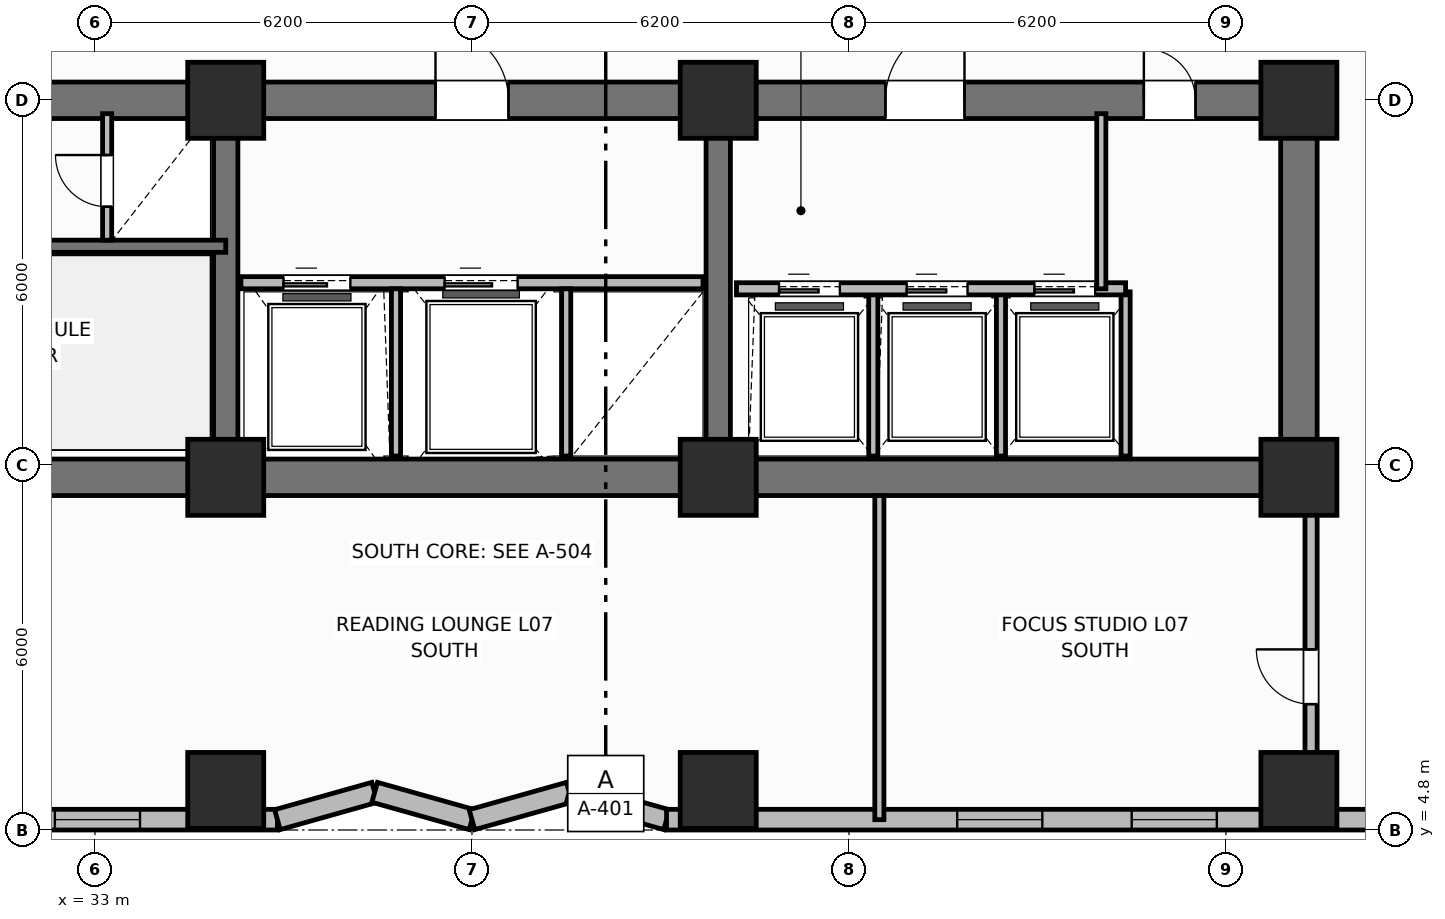
"""IFC4 building model, lengths in metres.
Left out: names, types, materials, properties, quantities, classifications, styles, units other than length and angle.
Written with IfcOpenShell. Run it as: python <this file> out.ifc"""

import sys

from ifc_helpers import new_model, si_unit, direction, frame, frame_2d, origin, origin_2d, place, context, subcontext, project, spatial, rectangle, extrude, element, fill, save


model = new_model("IFC4")
c1 = context("Model", 3, precision=1e-05, world=origin(), true_north=direction((0.0, 1.0)))
c2 = subcontext(c1, "Body", "Model", "MODEL_VIEW")
j1 = project(units=[si_unit("LENGTHUNIT", "METRE"), si_unit("PLANEANGLEUNIT", "RADIAN")], contexts=[c1])
p1 = place(None, origin())
s1 = spatial("IfcSite", under=j1, at=p1, CompositionType="ELEMENT")
p2 = place(p1, origin())
s2 = spatial("IfcBuilding", under=s1, at=p2, CompositionType="ELEMENT")
p3 = place(p2, frame((0.0, 0.0, 32.5)))
s3 = spatial("IfcBuildingStorey", under=s2, at=p3, CompositionType="ELEMENT", Elevation=32.5)
p4 = place(p3, frame((52.8, 10.6, 0.0), z_axis=(0.0, 0.0, 1.0), x_axis=(-1.0, 0.0, 0.0)))
e1 = element("IfcWall", 1, at=p4, inside=s3, PredefinedType="SHEAR", context=c2, shape_type="SweptSolid", body=[
    extrude(rectangle(XDim=27.2, YDim=0.6, at=frame_2d((13.6, 0.0))), origin(), (0.0, 0.0, 1.0), 3.7),
])
p5 = place(p3, frame((52.8, 10.9, 0.0), z_axis=(0.0, 0.0, 1.0), x_axis=(0.0, 1.0, 0.0)))
e2 = element("IfcWall", 2, at=p5, inside=s3, PredefinedType="SHEAR", context=c2, shape_type="SweptSolid", body=[
    extrude(rectangle(XDim=5.6, YDim=0.6, at=frame_2d((2.8, 0.0))), origin(), (0.0, 0.0, 1.0), 3.7),
])
p6 = place(p3, frame((25.6, 16.8, 0.0), z_axis=(0.0, 0.0, 1.0), x_axis=(1.0, 0.0, 0.0)))
e3 = element("IfcWall", 3, at=p6, inside=s3, PredefinedType="SHEAR", context=c2, shape_type="SweptSolid", body=[
    extrude(rectangle(XDim=27.2, YDim=0.6, at=frame_2d((13.6, 0.0))), origin(), (0.0, 0.0, 1.0), 3.7),
])
p7 = place(p6, frame((1.9, 0.0, 0.0)))
e4 = element("IfcOpeningElement", 4, at=p7, cuts=e3, PredefinedType="OPENING", context=c2, shape_type="SweptSolid", body=[
    extrude(rectangle(XDim=1.1, YDim=2.15, at=frame_2d((0.55, 1.075))), frame((0.0, 0.31, 0.0), z_axis=(0.0, -1.0, 0.0), x_axis=(1.0, 0.0, 0.0)), (0.0, 0.0, 1.0), 0.62),
])
p8 = place(p6, frame((13.0, 0.0, 0.0)))
e5 = element("IfcOpeningElement", 5, at=p8, cuts=e3, PredefinedType="OPENING", context=c2, shape_type="SweptSolid", body=[
    extrude(rectangle(XDim=1.2, YDim=2.15, at=frame_2d((0.6, 1.075))), frame((0.0, 0.31, 0.0), z_axis=(0.0, -1.0, 0.0), x_axis=(1.0, 0.0, 0.0)), (0.0, 0.0, 1.0), 0.62),
])
p9 = place(p6, frame((20.4, 0.0, 0.0)))
e6 = element("IfcOpeningElement", 6, at=p9, cuts=e3, PredefinedType="OPENING", context=c2, shape_type="SweptSolid", body=[
    extrude(rectangle(XDim=1.3, YDim=2.2, at=frame_2d((0.65, 1.1))), frame((0.0, 0.31, 0.0), z_axis=(0.0, -1.0, 0.0), x_axis=(1.0, 0.0, 0.0)), (0.0, 0.0, 1.0), 0.62),
])
p10 = place(p6, frame((24.65, 0.0, 0.0)))
e7 = element("IfcOpeningElement", 7, at=p10, cuts=e3, PredefinedType="OPENING", context=c2, shape_type="SweptSolid", body=[
    extrude(rectangle(XDim=0.85, YDim=2.1, at=frame_2d((0.425, 1.05))), frame((0.0, 0.31, 0.0), z_axis=(0.0, -1.0, 0.0), x_axis=(1.0, 0.0, 0.0)), (0.0, 0.0, 1.0), 0.62),
])
for number, where, z_axis, x_axis in (
    (8, (35.15, 10.9, 0.0), (0.0, 0.0, 1.0), (0.0, 1.0, 0.0)),
    (9, (43.25, 10.9, 0.0), (0.0, 0.0, 1.0), (0.0, 1.0, 0.0)),
):
    element("IfcWall", number, at=place(p3, frame(where, z_axis=z_axis, x_axis=x_axis)), inside=s3, PredefinedType="SHEAR", context=c2, shape_type="SweptSolid", body=[
        extrude(rectangle(XDim=5.6, YDim=0.4, at=frame_2d((2.8, 0.0))), origin(), (0.0, 0.0, 1.0), 3.7),
    ])
for number, where, z_axis, x_axis in (
    (10, (35.15, 10.6, 0.0), (0.0, 0.0, 1.0), (1.0, 0.0, 0.0)),
    (11, (35.15, 16.8, 0.0), (0.0, 0.0, 1.0), (1.0, 0.0, 0.0)),
    (12, (43.25, 10.6, 0.0), (0.0, 0.0, 1.0), (1.0, 0.0, 0.0)),
    (13, (43.25, 16.8, 0.0), (0.0, 0.0, 1.0), (1.0, 0.0, 0.0)),
    (14, (52.8, 10.6, 0.0), (0.0, 0.0, 1.0), (1.0, 0.0, 0.0)),
    (15, (52.8, 16.8, 0.0), (0.0, 0.0, 1.0), (1.0, 0.0, 0.0)),
    (16, (35.15, 5.45, 0.0), (0.0, 0.0, 1.0), (1.0, 0.0, 0.0)),
    (17, (43.25, 5.45, 0.0), (0.0, 0.0, 1.0), (1.0, 0.0, 0.0)),
    (18, (52.8, 5.45, 0.0), (0.0, 0.0, 1.0), (1.0, 0.0, 0.0)),
):
    element("IfcColumn", number, at=place(p3, frame(where, z_axis=z_axis, x_axis=x_axis)), inside=s3, PredefinedType="COLUMN", context=c2, shape_type="SweptSolid", body=[
        extrude(rectangle(XDim=1.25, YDim=1.25, at=origin_2d()), origin(), (0.0, 0.0, 1.0), 3.7),
    ])
p11 = place(p3, frame((18.6, 4.97, 0.0), z_axis=(0.0, 0.0, 1.0), x_axis=(1.0, 0.0, 0.0)))
e19 = element("IfcWall", 19, at=p11, inside=s3, PredefinedType="SOLIDWALL", context=c2, shape_type="SweptSolid", body=[
    extrude(rectangle(XDim=17.4, YDim=0.34, at=frame_2d((8.7, 0.0))), origin(), (0.0, 0.0, 1.0), 2.7),
])
p12 = place(p11, frame((1.56, 0.0, 0.73)))
e20 = element("IfcOpeningElement", 20, at=p12, cuts=e19, PredefinedType="OPENING", context=c2, shape_type="SweptSolid", body=[
    extrude(rectangle(XDim=1.4, YDim=1.85, at=frame_2d((0.7, 0.925))), frame((0.0, 0.18, 0.0), z_axis=(0.0, -1.0, 0.0), x_axis=(1.0, 0.0, 0.0)), (0.0, 0.0, 1.0), 0.36),
])
p13 = place(p11, frame((8.35, 0.0, 0.73)))
e21 = element("IfcOpeningElement", 21, at=p13, cuts=e19, PredefinedType="OPENING", context=c2, shape_type="SweptSolid", body=[
    extrude(rectangle(XDim=1.4, YDim=1.85, at=frame_2d((0.7, 0.925))), frame((0.0, 0.18, 0.0), z_axis=(0.0, -1.0, 0.0), x_axis=(1.0, 0.0, 0.0)), (0.0, 0.0, 1.0), 0.36),
])
p14 = place(p11, frame((11.22, 0.0, 0.73)))
e22 = element("IfcOpeningElement", 22, at=p14, cuts=e19, PredefinedType="OPENING", context=c2, shape_type="SweptSolid", body=[
    extrude(rectangle(XDim=1.4, YDim=1.85, at=frame_2d((0.7, 0.925))), frame((0.0, 0.18, 0.0), z_axis=(0.0, -1.0, 0.0), x_axis=(1.0, 0.0, 0.0)), (0.0, 0.0, 1.0), 0.36),
])
p15 = place(p11, frame((13.74, 0.0, 0.73)))
e23 = element("IfcOpeningElement", 23, at=p15, cuts=e19, PredefinedType="OPENING", context=c2, shape_type="SweptSolid", body=[
    extrude(rectangle(XDim=1.4, YDim=1.85, at=frame_2d((0.7, 0.925))), frame((0.0, 0.18, 0.0), z_axis=(0.0, -1.0, 0.0), x_axis=(1.0, 0.0, 0.0)), (0.0, 0.0, 1.0), 0.36),
])
p16 = place(p3, frame((36.0, 4.97, 0.0), z_axis=(0.0, 0.0, 1.0), x_axis=(0.962662902433, 0.270703040766, 0.0)))
e24 = element("IfcWall", 24, at=p16, inside=s3, PredefinedType="SOLIDWALL", context=c2, shape_type="SweptSolid", body=[
    extrude(rectangle(XDim=1.662, YDim=0.34, at=frame_2d((0.831, 0.0))), origin(), (0.0, 0.0, 1.0), 2.7),
])
p17 = place(p3, frame((37.6, 5.42, 0.0), z_axis=(0.0, 0.0, 1.0), x_axis=(0.962652136636, -0.270741322725, 0.0)))
e25 = element("IfcWall", 25, at=p17, inside=s3, PredefinedType="SOLIDWALL", context=c2, shape_type="SweptSolid", body=[
    extrude(rectangle(XDim=1.662, YDim=0.34, at=frame_2d((0.831, 0.0))), origin(), (0.0, 0.0, 1.0), 2.7),
])
p18 = place(p3, frame((39.2, 4.97, 0.0), z_axis=(0.0, 0.0, 1.0), x_axis=(0.962662902433, 0.270703040766, 0.0)))
e26 = element("IfcWall", 26, at=p18, inside=s3, PredefinedType="SOLIDWALL", context=c2, shape_type="SweptSolid", body=[
    extrude(rectangle(XDim=1.662, YDim=0.34, at=frame_2d((0.831, 0.0))), origin(), (0.0, 0.0, 1.0), 2.7),
])
p19 = place(p3, frame((40.8, 5.42, 0.0), z_axis=(0.0, 0.0, 1.0), x_axis=(0.962652136636, -0.270741322725, 0.0)))
e27 = element("IfcWall", 27, at=p19, inside=s3, PredefinedType="SOLIDWALL", context=c2, shape_type="SweptSolid", body=[
    extrude(rectangle(XDim=1.662, YDim=0.34, at=frame_2d((0.831, 0.0))), origin(), (0.0, 0.0, 1.0), 2.7),
])
p20 = place(p3, frame((42.4, 4.97, 0.0), z_axis=(0.0, 0.0, 1.0), x_axis=(1.0, 0.0, 0.0)))
e28 = element("IfcWall", 28, at=p20, inside=s3, PredefinedType="SOLIDWALL", context=c2, shape_type="SweptSolid", body=[
    extrude(rectangle(XDim=17.4, YDim=0.34, at=frame_2d((8.7, 0.0))), origin(), (0.0, 0.0, 1.0), 2.7),
])
p21 = place(p20, frame((4.78, 0.0, 0.73)))
e29 = element("IfcOpeningElement", 29, at=p21, cuts=e28, PredefinedType="OPENING", context=c2, shape_type="SweptSolid", body=[
    extrude(rectangle(XDim=1.4, YDim=1.85, at=frame_2d((0.7, 0.925))), frame((0.0, 0.18, 0.0), z_axis=(0.0, -1.0, 0.0), x_axis=(1.0, 0.0, 0.0)), (0.0, 0.0, 1.0), 0.36),
])
p22 = place(p20, frame((7.65, 0.0, 0.73)))
e30 = element("IfcOpeningElement", 30, at=p22, cuts=e28, PredefinedType="OPENING", context=c2, shape_type="SweptSolid", body=[
    extrude(rectangle(XDim=1.4, YDim=1.85, at=frame_2d((0.7, 0.925))), frame((0.0, 0.18, 0.0), z_axis=(0.0, -1.0, 0.0), x_axis=(1.0, 0.0, 0.0)), (0.0, 0.0, 1.0), 0.36),
])
p23 = place(p20, frame((14.44, 0.0, 0.73)))
e31 = element("IfcOpeningElement", 31, at=p23, cuts=e28, PredefinedType="OPENING", context=c2, shape_type="SweptSolid", body=[
    extrude(rectangle(XDim=1.4, YDim=1.85, at=frame_2d((0.7, 0.925))), frame((0.0, 0.18, 0.0), z_axis=(0.0, -1.0, 0.0), x_axis=(1.0, 0.0, 0.0)), (0.0, 0.0, 1.0), 0.36),
])
p24 = place(p3, frame((25.6, 14.4, 0.0), z_axis=(0.0, 0.0, 1.0), x_axis=(1.0, 0.0, 0.0)))
e32 = element("IfcWall", 32, at=p24, inside=s3, PredefinedType="SHEAR", context=c2, shape_type="SweptSolid", body=[
    extrude(rectangle(XDim=9.55, YDim=0.2, at=frame_2d((4.775, 0.0))), origin(), (0.0, 0.0, 1.0), 3.7),
])
p25 = place(p24, frame((1.05, 0.0, 0.0)))
e33 = element("IfcOpeningElement", 33, at=p25, cuts=e32, PredefinedType="OPENING", context=c2, shape_type="SweptSolid", body=[
    extrude(rectangle(XDim=1.1, YDim=2.15, at=frame_2d((0.55, 1.075))), frame((0.0, 0.11, 0.0), z_axis=(0.0, -1.0, 0.0), x_axis=(1.0, 0.0, 0.0)), (0.0, 0.0, 1.0), 0.22),
])
p26 = place(p3, frame((33.2, 14.5, 0.0), z_axis=(0.0, 0.0, 1.0), x_axis=(0.0, 1.0, 0.0)))
e34 = element("IfcWall", 34, at=p26, inside=s3, PredefinedType="PARTITIONING", context=c2, shape_type="SweptSolid", body=[
    extrude(rectangle(XDim=2.08, YDim=0.15, at=frame_2d((1.04, 0.0))), origin(), (0.0, 0.0, 1.0), 2.53),
])
p27 = place(p26, frame((0.55, 0.0, 0.0)))
e35 = element("IfcOpeningElement", 35, at=p27, cuts=e34, PredefinedType="OPENING", context=c2, shape_type="SweptSolid", body=[
    extrude(rectangle(XDim=0.85, YDim=2.05, at=frame_2d((0.425, 1.025))), frame((0.0, 0.085, 0.0), z_axis=(0.0, -1.0, 0.0), x_axis=(1.0, 0.0, 0.0)), (0.0, 0.0, 1.0), 0.17),
])
p28 = place(p3, frame((35.4, 13.8, 0.0), z_axis=(0.0, 0.0, 1.0), x_axis=(1.0, 0.0, 0.0)))
e36 = element("IfcWall", 36, at=p28, inside=s3, PredefinedType="PARTITIONING", context=c2, shape_type="SweptSolid", body=[
    extrude(rectangle(XDim=7.6, YDim=0.2, at=frame_2d((3.8, 0.0))), origin(), (0.0, 0.0, 1.0), 2.3),
])
p29 = place(p28, frame((0.7, 0.0, 0.0)))
e37 = element("IfcOpeningElement", 37, at=p29, cuts=e36, PredefinedType="OPENING", context=c2, shape_type="SweptSolid", body=[
    extrude(rectangle(XDim=1.1, YDim=2.15, at=frame_2d((0.55, 1.075))), frame((0.0, 0.11, 0.0), z_axis=(0.0, -1.0, 0.0), x_axis=(1.0, 0.0, 0.0)), (0.0, 0.0, 1.0), 0.22),
])
p30 = place(p28, frame((3.35, 0.0, 0.0)))
e38 = element("IfcOpeningElement", 38, at=p30, cuts=e36, PredefinedType="OPENING", context=c2, shape_type="SweptSolid", body=[
    extrude(rectangle(XDim=1.2, YDim=2.15, at=frame_2d((0.6, 1.075))), frame((0.0, 0.11, 0.0), z_axis=(0.0, -1.0, 0.0), x_axis=(1.0, 0.0, 0.0)), (0.0, 0.0, 1.0), 0.22),
])
for number, where, z_axis, x_axis in (
    (39, (37.95, 10.95, 0.0), (0.0, 0.0, 1.0), (0.0, 1.0, 0.0)),
    (40, (40.75, 10.95, 0.0), (0.0, 0.0, 1.0), (0.0, 1.0, 0.0)),
):
    element("IfcWall", number, at=place(p3, frame(where, z_axis=z_axis, x_axis=x_axis)), inside=s3, PredefinedType="PARTITIONING", context=c2, shape_type="SweptSolid", body=[
        extrude(rectangle(XDim=2.75, YDim=0.15, at=frame_2d((1.375, 0.0))), origin(), (0.0, 0.0, 1.0), 2.53),
    ])
for number, where, z_axis, x_axis in (
    (41, (45.8, 10.95, 0.0), (0.0, 0.0, 1.0), (0.0, 1.0, 0.0)),
    (42, (47.9, 10.95, 0.0), (0.0, 0.0, 1.0), (0.0, 1.0, 0.0)),
    (43, (49.95, 10.95, 0.0), (0.0, 0.0, 1.0), (0.0, 1.0, 0.0)),
):
    element("IfcWall", number, at=place(p3, frame(where, z_axis=z_axis, x_axis=x_axis)), inside=s3, PredefinedType="PARTITIONING", context=c2, shape_type="SweptSolid", body=[
        extrude(rectangle(XDim=2.7, YDim=0.15, at=frame_2d((1.35, 0.0))), origin(), (0.0, 0.0, 1.0), 2.53),
    ])
p31 = place(p3, frame((43.55, 13.7, 0.0), z_axis=(0.0, 0.0, 1.0), x_axis=(1.0, 0.0, 0.0)))
e44 = element("IfcWall", 44, at=p31, inside=s3, PredefinedType="PARTITIONING", context=c2, shape_type="SweptSolid", body=[
    extrude(rectangle(XDim=6.4, YDim=0.2, at=frame_2d((3.2, 0.0))), origin(), (0.0, 0.0, 1.0), 2.53),
])
p32 = place(p31, frame((0.7, 0.0, 0.0)))
e45 = element("IfcOpeningElement", 45, at=p32, cuts=e44, PredefinedType="OPENING", context=c2, shape_type="SweptSolid", body=[
    extrude(rectangle(XDim=1.0, YDim=2.15, at=frame_2d((0.5, 1.075))), frame((0.0, 0.11, 0.0), z_axis=(0.0, -1.0, 0.0), x_axis=(1.0, 0.0, 0.0)), (0.0, 0.0, 1.0), 0.22),
])
p33 = place(p31, frame((2.8, 0.0, 0.0)))
e46 = element("IfcOpeningElement", 46, at=p33, cuts=e44, PredefinedType="OPENING", context=c2, shape_type="SweptSolid", body=[
    extrude(rectangle(XDim=1.0, YDim=2.15, at=frame_2d((0.5, 1.075))), frame((0.0, 0.11, 0.0), z_axis=(0.0, -1.0, 0.0), x_axis=(1.0, 0.0, 0.0)), (0.0, 0.0, 1.0), 0.22),
])
p34 = place(p31, frame((4.9, 0.0, 0.0)))
e47 = element("IfcOpeningElement", 47, at=p34, cuts=e44, PredefinedType="OPENING", context=c2, shape_type="SweptSolid", body=[
    extrude(rectangle(XDim=1.0, YDim=2.15, at=frame_2d((0.5, 1.075))), frame((0.0, 0.11, 0.0), z_axis=(0.0, -1.0, 0.0), x_axis=(1.0, 0.0, 0.0)), (0.0, 0.0, 1.0), 0.22),
])
p35 = place(p3, frame((49.55, 13.7, 0.0), z_axis=(0.0, 0.0, 1.0), x_axis=(0.0, 1.0, 0.0)))
e48 = element("IfcWall", 48, at=p35, inside=s3, PredefinedType="PARTITIONING", context=c2, shape_type="SweptSolid", body=[
    extrude(rectangle(XDim=2.88, YDim=0.15, at=frame_2d((1.44, 0.0))), origin(), (0.0, 0.0, 1.0), 2.53),
])
p36 = place(p3, frame((45.9, 4.97, 0.0), z_axis=(0.0, 0.0, 1.0), x_axis=(0.0, 1.0, 0.0)))
e49 = element("IfcWall", 49, at=p36, inside=s3, PredefinedType="PARTITIONING", context=c2, shape_type="SweptSolid", body=[
    extrude(rectangle(XDim=5.33, YDim=0.15, at=frame_2d((2.665, 0.0))), origin(), (0.0, 0.0, 1.0), 2.53),
])
p37 = place(p3, frame((53.0, 5.57, 0.0), z_axis=(0.0, 0.0, 1.0), x_axis=(0.0, 1.0, 0.0)))
e50 = element("IfcWall", 50, at=p37, inside=s3, PredefinedType="PARTITIONING", context=c2, shape_type="SweptSolid", body=[
    extrude(rectangle(XDim=4.73, YDim=0.2, at=frame_2d((2.365, 0.0))), origin(), (0.0, 0.0, 1.0), 2.53),
])
p38 = place(p37, frame((1.3, 0.0, 0.0)))
e51 = element("IfcOpeningElement", 51, at=p38, cuts=e50, PredefinedType="OPENING", context=c2, shape_type="SweptSolid", body=[
    extrude(rectangle(XDim=0.9, YDim=2.1, at=frame_2d((0.45, 1.05))), frame((0.0, 0.11, 0.0), z_axis=(0.0, -1.0, 0.0), x_axis=(1.0, 0.0, 0.0)), (0.0, 0.0, 1.0), 0.22),
])
p39 = place(p15, origin())
e52 = element("IfcWindow", 52, at=p39, inside=s3, PartitioningType="SINGLE_PANEL", PredefinedType="WINDOW", context=c2, shape_type="SweptSolid", body=[
    extrude(rectangle(XDim=1.4, YDim=1.85, at=frame_2d((0.7, 0.925))), frame((0.0, 0.03, 0.0), z_axis=(0.0, -1.0, 0.0), x_axis=(1.0, 0.0, 0.0)), (0.0, 0.0, 1.0), 0.06),
])
fill(e23, e52)
p40 = place(p21, origin())
e53 = element("IfcWindow", 53, at=p40, inside=s3, PartitioningType="SINGLE_PANEL", PredefinedType="WINDOW", context=c2, shape_type="SweptSolid", body=[
    extrude(rectangle(XDim=1.4, YDim=1.85, at=frame_2d((0.7, 0.925))), frame((0.0, 0.03, 0.0), z_axis=(0.0, -1.0, 0.0), x_axis=(1.0, 0.0, 0.0)), (0.0, 0.0, 1.0), 0.06),
])
fill(e29, e53)
p41 = place(p22, origin())
e54 = element("IfcWindow", 54, at=p41, inside=s3, PartitioningType="SINGLE_PANEL", PredefinedType="WINDOW", context=c2, shape_type="SweptSolid", body=[
    extrude(rectangle(XDim=1.4, YDim=1.85, at=frame_2d((0.7, 0.925))), frame((0.0, 0.03, 0.0), z_axis=(0.0, -1.0, 0.0), x_axis=(1.0, 0.0, 0.0)), (0.0, 0.0, 1.0), 0.06),
])
fill(e30, e54)
p42 = place(p27, origin())
e55 = element("IfcDoor", 55, at=p42, inside=s3, OperationType="SINGLE_SWING_RIGHT", PredefinedType="TRAPDOOR", context=c2, shape_type="SweptSolid", body=[
    extrude(rectangle(XDim=0.85, YDim=2.05, at=frame_2d((0.425, 1.025))), frame((0.0, 0.025, 0.0), z_axis=(0.0, -1.0, 0.0), x_axis=(1.0, 0.0, 0.0)), (0.0, 0.0, 1.0), 0.05),
])
fill(e35, e55)
p43 = place(p29, origin())
e56 = element("IfcDoor", 56, at=p43, inside=s3, OperationType="SLIDING_TO_LEFT", PredefinedType="DOOR", context=c2, shape_type="SweptSolid", body=[
    extrude(rectangle(XDim=1.1, YDim=2.15, at=frame_2d((0.55, 1.075))), frame((0.0, 0.025, 0.0), z_axis=(0.0, -1.0, 0.0), x_axis=(1.0, 0.0, 0.0)), (0.0, 0.0, 1.0), 0.05),
])
fill(e37, e56)
p44 = place(p30, origin())
e57 = element("IfcDoor", 57, at=p44, inside=s3, OperationType="SLIDING_TO_LEFT", PredefinedType="DOOR", context=c2, shape_type="SweptSolid", body=[
    extrude(rectangle(XDim=1.2, YDim=2.15, at=frame_2d((0.6, 1.075))), frame((0.0, 0.025, 0.0), z_axis=(0.0, -1.0, 0.0), x_axis=(1.0, 0.0, 0.0)), (0.0, 0.0, 1.0), 0.05),
])
fill(e38, e57)
p45 = place(p32, origin())
e58 = element("IfcDoor", 58, at=p45, inside=s3, OperationType="SLIDING_TO_LEFT", PredefinedType="DOOR", context=c2, shape_type="SweptSolid", body=[
    extrude(rectangle(XDim=1.0, YDim=2.15, at=frame_2d((0.5, 1.075))), frame((0.0, 0.025, 0.0), z_axis=(0.0, -1.0, 0.0), x_axis=(1.0, 0.0, 0.0)), (0.0, 0.0, 1.0), 0.05),
])
fill(e45, e58)
p46 = place(p33, origin())
e59 = element("IfcDoor", 59, at=p46, inside=s3, OperationType="SLIDING_TO_LEFT", PredefinedType="DOOR", context=c2, shape_type="SweptSolid", body=[
    extrude(rectangle(XDim=1.0, YDim=2.15, at=frame_2d((0.5, 1.075))), frame((0.0, 0.025, 0.0), z_axis=(0.0, -1.0, 0.0), x_axis=(1.0, 0.0, 0.0)), (0.0, 0.0, 1.0), 0.05),
])
fill(e46, e59)
p47 = place(p34, origin())
e60 = element("IfcDoor", 60, at=p47, inside=s3, OperationType="SLIDING_TO_LEFT", PredefinedType="DOOR", context=c2, shape_type="SweptSolid", body=[
    extrude(rectangle(XDim=1.0, YDim=2.15, at=frame_2d((0.5, 1.075))), frame((0.0, 0.025, 0.0), z_axis=(0.0, -1.0, 0.0), x_axis=(1.0, 0.0, 0.0)), (0.0, 0.0, 1.0), 0.05),
])
fill(e47, e60)
p48 = place(p38, origin())
e61 = element("IfcDoor", 61, at=p48, inside=s3, OperationType="SINGLE_SWING_RIGHT", PredefinedType="DOOR", context=c2, shape_type="SweptSolid", body=[
    extrude(rectangle(XDim=0.9, YDim=2.1, at=frame_2d((0.45, 1.05))), frame((0.0, 0.025, 0.0), z_axis=(0.0, -1.0, 0.0), x_axis=(1.0, 0.0, 0.0)), (0.0, 0.0, 1.0), 0.05),
])
fill(e51, e61)
p49 = place(p8, origin())
e62 = element("IfcDoor", 62, at=p49, inside=s3, OperationType="SINGLE_SWING_LEFT", PredefinedType="DOOR", context=c2, shape_type="SweptSolid", body=[
    extrude(rectangle(XDim=1.2, YDim=2.15, at=frame_2d((0.6, 1.075))), frame((0.0, 0.025, 0.0), z_axis=(0.0, -1.0, 0.0), x_axis=(1.0, 0.0, 0.0)), (0.0, 0.0, 1.0), 0.05),
])
fill(e5, e62)
p50 = place(p9, origin())
e63 = element("IfcDoor", 63, at=p50, inside=s3, OperationType="SINGLE_SWING_RIGHT", PredefinedType="DOOR", context=c2, shape_type="SweptSolid", body=[
    extrude(rectangle(XDim=1.3, YDim=2.2, at=frame_2d((0.65, 1.1))), frame((0.0, 0.025, 0.0), z_axis=(0.0, -1.0, 0.0), x_axis=(1.0, 0.0, 0.0)), (0.0, 0.0, 1.0), 0.05),
])
fill(e6, e63)
p51 = place(p10, origin())
e64 = element("IfcDoor", 64, at=p51, inside=s3, OperationType="SINGLE_SWING_LEFT", PredefinedType="DOOR", context=c2, shape_type="SweptSolid", body=[
    extrude(rectangle(XDim=0.85, YDim=2.1, at=frame_2d((0.425, 1.05))), frame((0.0, 0.025, 0.0), z_axis=(0.0, -1.0, 0.0), x_axis=(1.0, 0.0, 0.0)), (0.0, 0.0, 1.0), 0.05),
])
fill(e7, e64)
save(model, sys.argv[1])
